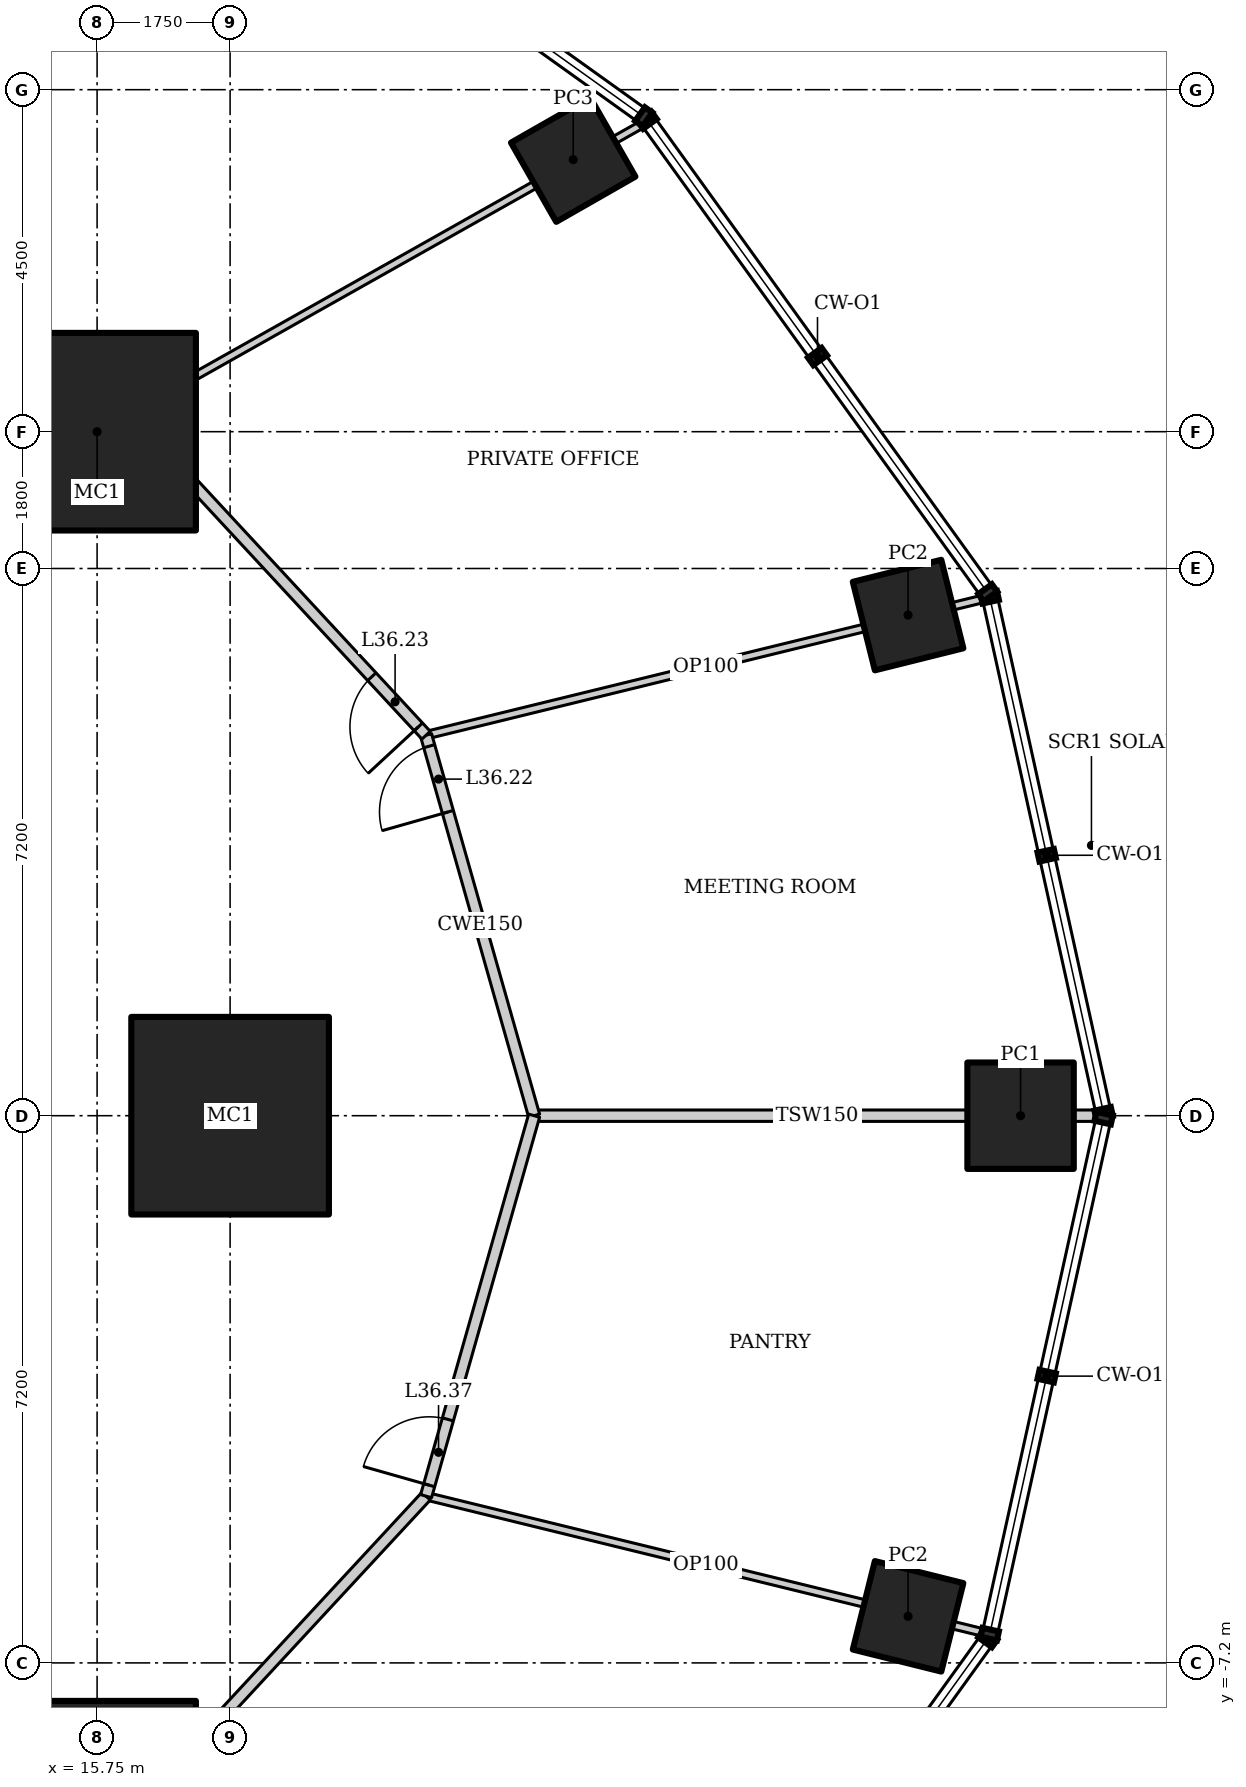
"""IFC4 building model, lengths in metres.
Left out: names, types, materials, properties, quantities, classifications, styles, units other than length and angle.
Written with IfcOpenShell. Run it as: python <this file> out.ifc"""

import sys

from ifc_helpers import new_model, si_unit, direction, frame, frame_2d, origin, origin_2d, place, context, subcontext, project, spatial, rectangle, hollow_rectangle, extrude, element, fill, save


model = new_model("IFC4")
c1 = context("Model", 3, precision=1e-05, world=origin(), true_north=direction((0.0, 1.0)))
c2 = subcontext(c1, "Body", "Model", "MODEL_VIEW")
j1 = project(units=[si_unit("LENGTHUNIT", "METRE"), si_unit("PLANEANGLEUNIT", "RADIAN")], contexts=[c1])
p1 = place(None, origin())
s1 = spatial("IfcSite", under=j1, at=p1, CompositionType="ELEMENT")
p2 = place(p1, origin())
s2 = spatial("IfcBuilding", under=s1, at=p2, CompositionType="ELEMENT")
p3 = place(p2, frame((0.0, 0.0, 155.2)))
s3 = spatial("IfcBuildingStorey", under=s2, at=p3, CompositionType="ELEMENT", Elevation=155.2)
for number, where, z_axis, x_axis in (
    (1, (17.5, 0.0, 0.0), (0.0, 0.0, 1.0), (1.0, 0.0, 0.0)),
    (2, (15.75, 9.0, 0.0), (0.0, 0.0, 1.0), (1.0, 0.0, 0.0)),
    (3, (15.75, -9.0, 0.0), (0.0, 0.0, 1.0), (1.0, 0.0, 0.0)),
):
    element("IfcColumn", number, at=place(p3, frame(where, z_axis=z_axis, x_axis=x_axis)), inside=s3, PredefinedType="COLUMN", context=c2, shape_type="SweptSolid", body=[
        extrude(hollow_rectangle(XDim=2.6, YDim=2.6, WallThickness=0.13, at=origin_2d()), origin(), (0.0, 0.0, 1.0), 4.2),
    ])
p4 = place(p3, frame((27.9, 0.0, 0.0), z_axis=(0.0, 0.0, 1.0), x_axis=(1.0, 0.0, 0.0)))
e4 = element("IfcColumn", 4, at=p4, inside=s3, PredefinedType="COLUMN", context=c2, shape_type="SweptSolid", body=[
    extrude(hollow_rectangle(XDim=1.4, YDim=1.4, WallThickness=0.1, at=origin_2d()), origin(), (0.0, 0.0, 1.0), 4.2),
])
p5 = place(p3, frame((26.42, 6.587, 0.0), z_axis=(0.0, 0.0, 1.0), x_axis=(0.970295726276, 0.2419218956, 0.0)))
e5 = element("IfcColumn", 5, at=p5, inside=s3, PredefinedType="COLUMN", context=c2, shape_type="SweptSolid", body=[
    extrude(hollow_rectangle(XDim=1.2, YDim=1.2, WallThickness=0.1, at=origin_2d()), origin(), (0.0, 0.0, 1.0), 4.2),
])
p6 = place(p3, frame((22.014, 12.579, 0.0), z_axis=(0.0, 0.0, 1.0), x_axis=(0.86824298017, 0.496139221777, 0.0)))
e6 = element("IfcColumn", 6, at=p6, inside=s3, PredefinedType="COLUMN", context=c2, shape_type="SweptSolid", body=[
    extrude(hollow_rectangle(XDim=1.2, YDim=1.2, WallThickness=0.12, at=origin_2d()), origin(), (0.0, 0.0, 1.0), 4.2),
])
p7 = place(p3, frame((26.42, -6.587, 0.0), z_axis=(0.0, 0.0, 1.0), x_axis=(0.2419218956, 0.970295726276, 0.0)))
e7 = element("IfcColumn", 7, at=p7, inside=s3, PredefinedType="COLUMN", context=c2, shape_type="SweptSolid", body=[
    extrude(hollow_rectangle(XDim=1.2, YDim=1.2, WallThickness=0.1, at=origin_2d()), origin(), (0.0, 0.0, 1.0), 4.2),
])
p8 = place(p3, frame((28.944, 0.0, 0.0), z_axis=(0.0, 0.0, 1.0), x_axis=(-1.0, 0.0, 0.0)))
e8 = element("IfcWall", 8, at=p8, inside=s3, PredefinedType="PARTITIONING", context=c2, shape_type="SweptSolid", body=[
    extrude(rectangle(XDim=7.444, YDim=0.15, at=frame_2d((3.722, 0.0))), origin(), (0.0, 0.0, 1.0), 3.204),
])
p9 = place(p3, frame((27.441, 6.809, 0.0), z_axis=(0.0, 0.0, 1.0), x_axis=(-0.971305815804, -0.237834001323, 0.0)))
e9 = element("IfcWall", 9, at=p9, inside=s3, PredefinedType="PARTITIONING", context=c2, shape_type="SweptSolid", body=[
    extrude(rectangle(XDim=7.58, YDim=0.1, at=frame_2d((3.79, 0.0))), origin(), (0.0, 0.0, 1.0), 3.113),
])
p10 = place(p3, frame((22.949, 13.059, 0.0), z_axis=(0.0, 0.0, 1.0), x_axis=(-0.871274989434, -0.490795163777, 0.0)))
e10 = element("IfcWall", 10, at=p10, inside=s3, PredefinedType="PARTITIONING", context=c2, shape_type="SweptSolid", body=[
    extrude(rectangle(XDim=7.792, YDim=0.1, at=frame_2d((3.896, 0.0))), origin(), (0.0, 0.0, 1.0), 3.451),
])
p11 = place(p3, frame((27.441, -6.809, 0.0), z_axis=(0.0, 0.0, 1.0), x_axis=(-0.971305815804, 0.237834001323, 0.0)))
e11 = element("IfcWall", 11, at=p11, inside=s3, PredefinedType="PARTITIONING", context=c2, shape_type="SweptSolid", body=[
    extrude(rectangle(XDim=7.58, YDim=0.1, at=frame_2d((3.79, 0.0))), origin(), (0.0, 0.0, 1.0), 3.113),
])
p12 = place(p3, frame((21.5, 0.0, 0.0), z_axis=(0.0, 0.0, 1.0), x_axis=(-0.273177936169, 0.961963520717, 0.0)))
e12 = element("IfcWall", 12, at=p12, inside=s3, PredefinedType="PARTITIONING", context=c2, shape_type="SweptSolid", body=[
    extrude(rectangle(XDim=5.204, YDim=0.15, at=frame_2d((2.602, 0.0))), origin(), (0.0, 0.0, 1.0), 4.05),
])
p13 = place(p12, frame((4.154, 0.0, 0.0)))
e13 = element("IfcOpeningElement", 13, at=p13, cuts=e12, PredefinedType="OPENING", context=c2, shape_type="SweptSolid", body=[
    extrude(rectangle(XDim=0.9, YDim=2.1, at=frame_2d((0.45, 1.05))), frame((0.0, 0.085, 0.0), z_axis=(0.0, -1.0, 0.0), x_axis=(1.0, 0.0, 0.0)), (0.0, 0.0, 1.0), 0.17),
])
p14 = place(p3, frame((20.078, 5.006, 0.0), z_axis=(0.0, 0.0, 1.0), x_axis=(-0.679724658223, 0.733467374191, 0.0)))
e14 = element("IfcWall", 14, at=p14, inside=s3, PredefinedType="PARTITIONING", context=c2, shape_type="SweptSolid", body=[
    extrude(rectangle(XDim=5.765, YDim=0.15, at=frame_2d((2.882, 0.0))), origin(), (0.0, 0.0, 1.0), 4.05),
])
p15 = place(p14, frame((0.15, 0.0, 0.0)))
e15 = element("IfcOpeningElement", 15, at=p15, cuts=e14, PredefinedType="OPENING", context=c2, shape_type="SweptSolid", body=[
    extrude(rectangle(XDim=0.9, YDim=2.1, at=frame_2d((0.45, 1.05))), frame((0.0, 0.085, 0.0), z_axis=(0.0, -1.0, 0.0), x_axis=(1.0, 0.0, 0.0)), (0.0, 0.0, 1.0), 0.17),
])
p16 = place(p3, frame((16.16, 9.234, 0.0), z_axis=(0.0, 0.0, 1.0), x_axis=(-0.87433873028, 0.485316169865, 0.0)))
e16 = element("IfcWall", 16, at=p16, inside=s3, PredefinedType="PARTITIONING", context=c2, shape_type="SweptSolid", body=[
    extrude(rectangle(XDim=5.393, YDim=0.15, at=frame_2d((2.696, 0.0))), origin(), (0.0, 0.0, 1.0), 4.05),
])
p17 = place(p3, frame((16.16, -9.234, 0.0), z_axis=(0.0, 0.0, 1.0), x_axis=(0.679724658223, 0.733467374191, 0.0)))
e17 = element("IfcWall", 17, at=p17, inside=s3, PredefinedType="PARTITIONING", context=c2, shape_type="SweptSolid", body=[
    extrude(rectangle(XDim=5.765, YDim=0.15, at=frame_2d((2.882, 0.0))), origin(), (0.0, 0.0, 1.0), 4.05),
])
p18 = place(p3, frame((20.078, -5.006, 0.0), z_axis=(0.0, 0.0, 1.0), x_axis=(0.273177936169, 0.961963520717, 0.0)))
e18 = element("IfcWall", 18, at=p18, inside=s3, PredefinedType="PARTITIONING", context=c2, shape_type="SweptSolid", body=[
    extrude(rectangle(XDim=5.204, YDim=0.15, at=frame_2d((2.602, 0.0))), origin(), (0.0, 0.0, 1.0), 4.05),
])
p19 = place(p18, frame((0.15, 0.0, 0.0)))
e19 = element("IfcOpeningElement", 19, at=p19, cuts=e18, PredefinedType="OPENING", context=c2, shape_type="SweptSolid", body=[
    extrude(rectangle(XDim=0.9, YDim=2.1, at=frame_2d((0.45, 1.05))), frame((0.0, 0.085, 0.0), z_axis=(0.0, -1.0, 0.0), x_axis=(1.0, 0.0, 0.0)), (0.0, 0.0, 1.0), 0.17),
])
p20 = place(p13, origin())
e20 = element("IfcDoor", 20, at=p20, inside=s3, OperationType="SINGLE_SWING_LEFT", PredefinedType="DOOR", context=c2, shape_type="SweptSolid", body=[
    extrude(rectangle(XDim=0.9, YDim=2.1, at=frame_2d((0.45, 1.05))), frame((0.0, 0.025, 0.0), z_axis=(0.0, -1.0, 0.0), x_axis=(1.0, 0.0, 0.0)), (0.0, 0.0, 1.0), 0.05),
])
fill(e13, e20)
p21 = place(p15, origin())
e21 = element("IfcDoor", 21, at=p21, inside=s3, OperationType="SINGLE_SWING_LEFT", PredefinedType="DOOR", context=c2, shape_type="SweptSolid", body=[
    extrude(rectangle(XDim=0.9, YDim=2.1, at=frame_2d((0.45, 1.05))), frame((0.0, 0.025, 0.0), z_axis=(0.0, -1.0, 0.0), x_axis=(1.0, 0.0, 0.0)), (0.0, 0.0, 1.0), 0.05),
])
fill(e15, e21)
p22 = place(p19, origin())
e22 = element("IfcDoor", 22, at=p22, inside=s3, OperationType="SINGLE_SWING_LEFT", PredefinedType="DOOR", context=c2, shape_type="SweptSolid", body=[
    extrude(rectangle(XDim=0.9, YDim=2.1, at=frame_2d((0.45, 1.05))), frame((0.0, 0.025, 0.0), z_axis=(0.0, -1.0, 0.0), x_axis=(1.0, 0.0, 0.0)), (0.0, 0.0, 1.0), 0.05),
])
fill(e19, e22)
save(model, sys.argv[1])
